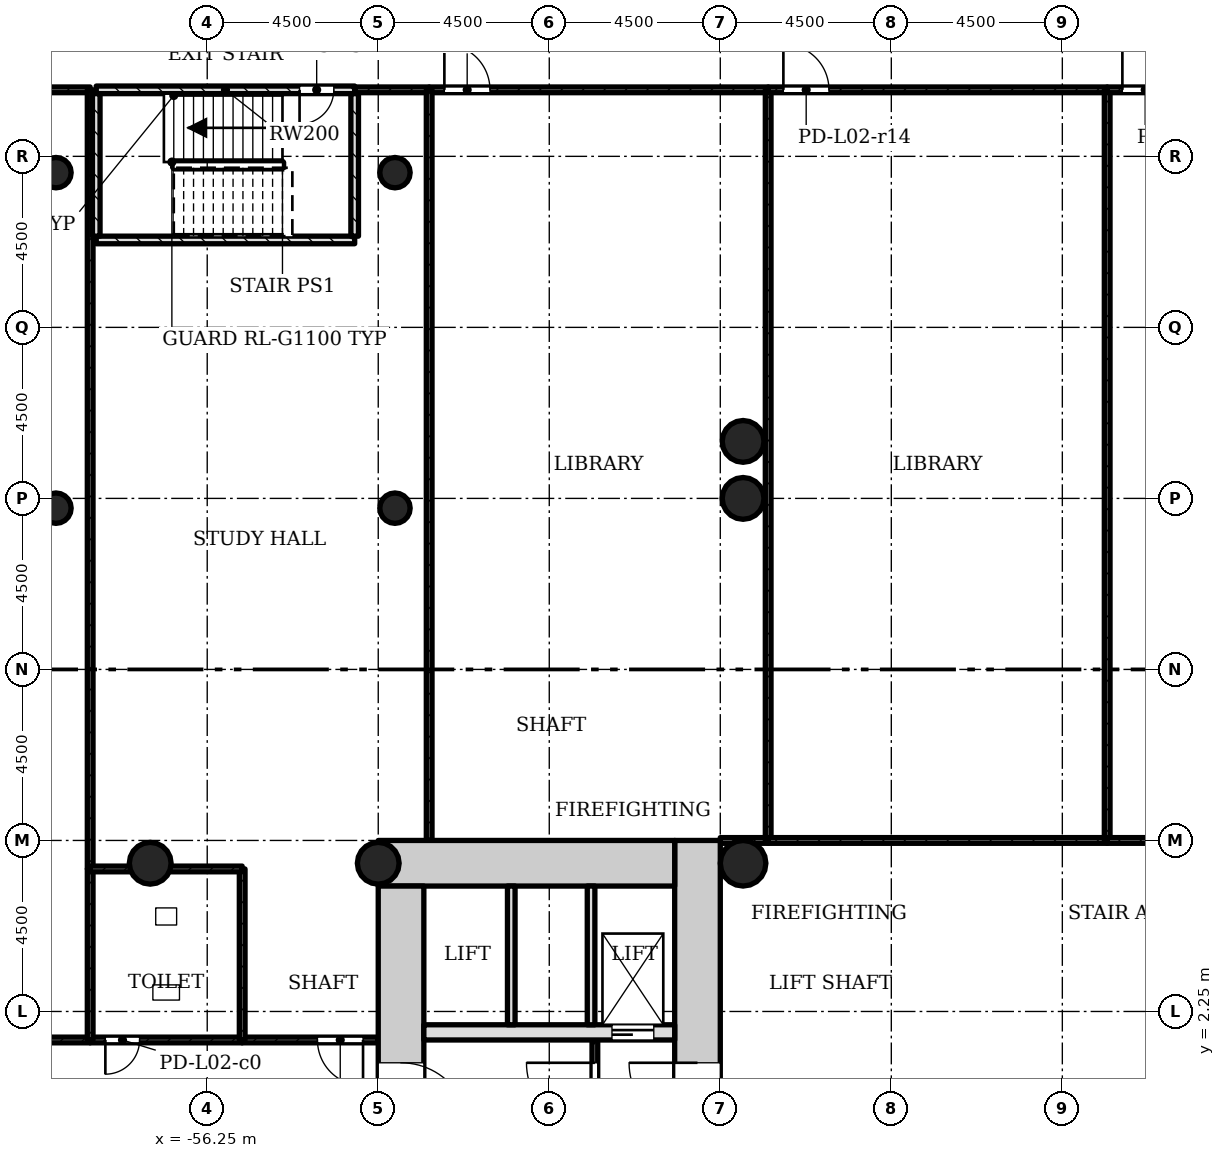
"""IFC4 building model, lengths in metres.
Left out: names, types, materials, properties, quantities, classifications, styles, units other than length and angle.
Written with IfcOpenShell. Run it as: python <this file> out.ifc"""

import sys

from ifc_helpers import new_model, si_unit, direction, frame, frame_2d, origin, origin_2d, place, context, subcontext, project, spatial, rectangle, hollow_circle, extrude, element, fill, save


model = new_model("IFC4")
c1 = context("Model", 3, precision=1e-05, world=origin(), true_north=direction((0.0, 1.0)))
c2 = subcontext(c1, "Body", "Model", "MODEL_VIEW")
j1 = project(units=[si_unit("LENGTHUNIT", "METRE"), si_unit("PLANEANGLEUNIT", "RADIAN")], contexts=[c1])
p1 = place(None, origin())
s1 = spatial("IfcSite", under=j1, at=p1, CompositionType="ELEMENT")
p2 = place(p1, origin())
s2 = spatial("IfcBuilding", under=s1, at=p2, CompositionType="ELEMENT")
p3 = place(p2, frame((0.0, 0.0, 11.0)))
s3 = spatial("IfcBuildingStorey", under=s2, at=p3, CompositionType="ELEMENT", Elevation=11.0)
p4 = place(p3, frame((-43.35, -5.55, 0.0), z_axis=(0.0, 0.0, 1.0), x_axis=(0.0, 1.0, 0.0)))
e1 = element("IfcWall", 1, at=p4, inside=s3, PredefinedType="SHEAR", context=c2, shape_type="SweptSolid", body=[
    extrude(rectangle(XDim=12.3, YDim=1.2, at=frame_2d((6.15, 0.0))), origin(), (0.0, 0.0, 1.0), 4.5),
])
p5 = place(p4, frame((4.65, 0.0, 0.0)))
e2 = element("IfcOpeningElement", 2, at=p5, cuts=e1, PredefinedType="OPENING", context=c2, shape_type="SweptSolid", body=[
    extrude(rectangle(XDim=1.8, YDim=2.1, at=frame_2d((0.9, 1.05))), frame((0.0, 0.61, 0.0), z_axis=(0.0, -1.0, 0.0), x_axis=(1.0, 0.0, 0.0)), (0.0, 0.0, 1.0), 1.22),
])
p6 = place(p3, frame((-43.95, 6.15, 0.0), z_axis=(0.0, 0.0, 1.0), x_axis=(-1.0, 0.0, 0.0)))
e3 = element("IfcWall", 3, at=p6, inside=s3, PredefinedType="SHEAR", context=c2, shape_type="SweptSolid", body=[
    extrude(rectangle(XDim=7.8, YDim=1.2, at=frame_2d((3.9, 0.0))), origin(), (0.0, 0.0, 1.0), 4.5),
])
p7 = place(p3, frame((-51.15, 5.55, 0.0), z_axis=(0.0, 0.0, 1.0), x_axis=(0.0, -1.0, 0.0)))
e4 = element("IfcWall", 4, at=p7, inside=s3, PredefinedType="SHEAR", context=c2, shape_type="SweptSolid", body=[
    extrude(rectangle(XDim=12.3, YDim=1.2, at=frame_2d((6.15, 0.0))), origin(), (0.0, 0.0, 1.0), 4.5),
])
p8 = place(p7, frame((4.65, 0.0, 0.0)))
e5 = element("IfcOpeningElement", 5, at=p8, cuts=e4, PredefinedType="OPENING", context=c2, shape_type="SweptSolid", body=[
    extrude(rectangle(XDim=1.8, YDim=2.1, at=frame_2d((0.9, 1.05))), frame((0.0, 0.61, 0.0), z_axis=(0.0, -1.0, 0.0), x_axis=(1.0, 0.0, 0.0)), (0.0, 0.0, 1.0), 1.22),
])
p9 = place(p3, frame((-50.55, 1.7, 0.0), z_axis=(0.0, 0.0, 1.0), x_axis=(1.0, 0.0, 0.0)))
e6 = element("IfcWall", 6, at=p9, inside=s3, PredefinedType="SHEAR", context=c2, shape_type="SweptSolid", body=[
    extrude(rectangle(XDim=6.6, YDim=0.4, at=frame_2d((3.3, 0.0))), origin(), (0.0, 0.0, 1.0), 4.5),
])
p10 = place(p9, frame((4.95, 0.0, 0.0)))
e7 = element("IfcOpeningElement", 7, at=p10, cuts=e6, PredefinedType="OPENING", context=c2, shape_type="SweptSolid", body=[
    extrude(rectangle(XDim=1.1, YDim=2.1, at=frame_2d((0.55, 1.05))), frame((0.0, 0.21, 0.0), z_axis=(0.0, -1.0, 0.0), x_axis=(1.0, 0.0, 0.0)), (0.0, 0.0, 1.0), 0.42),
])
for number, where, z_axis, x_axis in (
    (8, (-42.15, 15.75, 0.0), (0.0, 0.0, 1.0), (1.0, 0.0, 0.0)),
    (9, (-42.15, 17.25, 0.0), (0.0, 0.0, 1.0), (1.0, 0.0, 0.0)),
    (10, (-51.75, 6.15, 0.0), (0.0, 0.0, 1.0), (1.0, 0.0, 0.0)),
    (11, (-57.75, 6.15, 0.0), (0.0, 0.0, 1.0), (1.0, 0.0, 0.0)),
):
    element("IfcColumn", number, at=place(p3, frame(where, z_axis=z_axis, x_axis=x_axis)), inside=s3, PredefinedType="COLUMN", context=c2, shape_type="SweptSolid", body=[
        extrude(hollow_circle(Radius=0.55, WallThickness=0.04, at=origin_2d()), origin(), (0.0, 0.0, 1.0), 4.5),
    ])
p11 = place(p3, frame((-42.15, 6.15, 0.0), z_axis=(0.0, 0.0, 1.0), x_axis=(1.0, 0.0, 0.0)))
e12 = element("IfcColumn", 12, at=p11, inside=s3, PredefinedType="COLUMN", context=c2, shape_type="SweptSolid", body=[
    extrude(hollow_circle(Radius=0.6, WallThickness=0.045, at=origin_2d()), origin(), (0.0, 0.0, 1.0), 4.5),
])
for number, where, z_axis, x_axis in (
    (13, (-60.23, 15.493, 0.0), (0.0, 0.0, 1.0), (1.0, 0.0, 0.0)),
    (14, (-51.31, 15.493, 0.0), (0.0, 0.0, 1.0), (1.0, 0.0, 0.0)),
    (15, (-60.23, 24.321, 0.0), (0.0, 0.0, 1.0), (1.0, 0.0, 0.0)),
    (16, (-51.31, 24.321, 0.0), (0.0, 0.0, 1.0), (1.0, 0.0, 0.0)),
):
    element("IfcColumn", number, at=place(p3, frame(where, z_axis=z_axis, x_axis=x_axis)), inside=s3, PredefinedType="COLUMN", context=c2, shape_type="SweptSolid", body=[
        extrude(hollow_circle(Radius=0.4, WallThickness=0.028, at=origin_2d()), origin(), (0.0, 0.0, 1.0), 4.5),
    ])
p12 = place(p3, frame((-46.05, 1.5, 0.0), z_axis=(0.0, 0.0, 1.0), x_axis=(0.0, -1.0, 0.0)))
e17 = element("IfcWall", 17, at=p12, inside=s3, PredefinedType="PARTITIONING", context=c2, shape_type="SweptSolid", body=[
    extrude(rectangle(XDim=3.0, YDim=0.15, at=frame_2d((1.5, 0.0))), origin(), (0.0, 0.0, 1.0), 4.08),
])
p13 = place(p12, frame((0.6, 0.0, 0.0)))
e18 = element("IfcOpeningElement", 18, at=p13, cuts=e17, PredefinedType="OPENING", context=c2, shape_type="SweptSolid", body=[
    extrude(rectangle(XDim=1.8, YDim=2.1, at=frame_2d((0.9, 1.05))), frame((0.0, 0.085, 0.0), z_axis=(0.0, -1.0, 0.0), x_axis=(1.0, 0.0, 0.0)), (0.0, 0.0, 1.0), 0.17),
])
for number, where, z_axis, x_axis in (
    (19, (-46.15, 5.55, 0.0), (0.0, 0.0, 1.0), (0.0, -1.0, 0.0)),
    (20, (-48.25, 5.55, 0.0), (0.0, 0.0, 1.0), (0.0, -1.0, 0.0)),
):
    element("IfcWall", number, at=place(p3, frame(where, z_axis=z_axis, x_axis=x_axis)), inside=s3, PredefinedType="SOLIDWALL", context=c2, shape_type="SweptSolid", body=[
        extrude(rectangle(XDim=3.65, YDim=0.2, at=frame_2d((1.825, 0.0))), origin(), (0.0, 0.0, 1.0), 4.08),
    ])
p14 = place(p3, frame((-59.33, 1.5, 0.0), z_axis=(0.0, 0.0, 1.0), x_axis=(-1.0, 0.0, 0.0)))
e21 = element("IfcWall", 21, at=p14, inside=s3, PredefinedType="PARTITIONING", context=c2, shape_type="SweptSolid", body=[
    extrude(rectangle(XDim=1.96, YDim=0.15, at=frame_2d((0.98, 0.0))), origin(), (0.0, 0.0, 1.0), 4.08),
])
p15 = place(p3, frame((-69.85, 26.5, 0.0), z_axis=(0.0, 0.0, 1.0), x_axis=(1.0, 0.0, 0.0)))
e22 = element("IfcWall", 22, at=p15, inside=s3, PredefinedType="PARTITIONING", context=c2, shape_type="SweptSolid", body=[
    extrude(rectangle(XDim=10.52, YDim=0.15, at=frame_2d((5.26, 0.0))), origin(), (0.0, 0.0, 1.0), 4.08),
])
p16 = place(p15, frame((0.9, 0.0, 0.0)))
e23 = element("IfcOpeningElement", 23, at=p16, cuts=e22, PredefinedType="OPENING", context=c2, shape_type="SweptSolid", body=[
    extrude(rectangle(XDim=1.2, YDim=2.1, at=frame_2d((0.6, 1.05))), frame((0.0, 0.085, 0.0), z_axis=(0.0, -1.0, 0.0), x_axis=(1.0, 0.0, 0.0)), (0.0, 0.0, 1.0), 0.17),
])
p17 = place(p3, frame((-59.33, 26.5, 0.0), z_axis=(0.0, 0.0, 1.0), x_axis=(0.0, -1.0, 0.0)))
e24 = element("IfcWall", 24, at=p17, inside=s3, PredefinedType="PARTITIONING", context=c2, shape_type="SweptSolid", body=[
    extrude(rectangle(XDim=20.5, YDim=0.15, at=frame_2d((10.25, 0.0))), origin(), (0.0, 0.0, 1.0), 4.08),
])
p18 = place(p3, frame((-51.75, 1.5, 0.0), z_axis=(0.0, 0.0, 1.0), x_axis=(-1.0, 0.0, 0.0)))
e25 = element("IfcWall", 25, at=p18, inside=s3, PredefinedType="PARTITIONING", context=c2, shape_type="SweptSolid", body=[
    extrude(rectangle(XDim=3.58, YDim=0.15, at=frame_2d((1.79, 0.0))), origin(), (0.0, 0.0, 1.0), 4.08),
])
p19 = place(p18, frame((0.4, 0.0, 0.0)))
e26 = element("IfcOpeningElement", 26, at=p19, cuts=e25, PredefinedType="OPENING", context=c2, shape_type="SweptSolid", body=[
    extrude(rectangle(XDim=1.2, YDim=2.1, at=frame_2d((0.6, 1.05))), frame((0.0, 0.085, 0.0), z_axis=(0.0, -1.0, 0.0), x_axis=(1.0, 0.0, 0.0)), (0.0, 0.0, 1.0), 0.17),
])
p20 = place(p3, frame((-52.37, 26.5, 0.0), z_axis=(0.0, 0.0, 1.0), x_axis=(1.0, 0.0, 0.0)))
e27 = element("IfcWall", 27, at=p20, inside=s3, PredefinedType="PARTITIONING", context=c2, shape_type="SweptSolid", body=[
    extrude(rectangle(XDim=1.96, YDim=0.15, at=frame_2d((0.98, 0.0))), origin(), (0.0, 0.0, 1.0), 4.08),
])
p21 = place(p3, frame((-50.41, 26.5, 0.0), z_axis=(0.0, 0.0, 1.0), x_axis=(1.0, 0.0, 0.0)))
e28 = element("IfcWall", 28, at=p21, inside=s3, PredefinedType="PARTITIONING", context=c2, shape_type="SweptSolid", body=[
    extrude(rectangle(XDim=8.92, YDim=0.15, at=frame_2d((4.46, 0.0))), origin(), (0.0, 0.0, 1.0), 4.08),
])
p22 = place(p21, frame((0.4, 0.0, 0.0)))
e29 = element("IfcOpeningElement", 29, at=p22, cuts=e28, PredefinedType="OPENING", context=c2, shape_type="SweptSolid", body=[
    extrude(rectangle(XDim=1.2, YDim=2.1, at=frame_2d((0.6, 1.05))), frame((0.0, 0.085, 0.0), z_axis=(0.0, -1.0, 0.0), x_axis=(1.0, 0.0, 0.0)), (0.0, 0.0, 1.0), 0.17),
])
p23 = place(p3, frame((-41.49, 6.75, 0.0), z_axis=(0.0, 0.0, 1.0), x_axis=(-1.0, 0.0, 0.0)))
e30 = element("IfcWall", 30, at=p23, inside=s3, PredefinedType="PARTITIONING", context=c2, shape_type="SweptSolid", body=[
    extrude(rectangle(XDim=1.26, YDim=0.15, at=frame_2d((0.63, 0.0))), origin(), (0.0, 0.0, 1.0), 4.08),
])
for number, where, z_axis, x_axis in (
    (31, (-50.41, 6.75, 0.0), (0.0, 0.0, 1.0), (0.0, 1.0, 0.0)),
    (32, (-41.49, 26.5, 0.0), (0.0, 0.0, 1.0), (0.0, -1.0, 0.0)),
):
    element("IfcWall", number, at=place(p3, frame(where, z_axis=z_axis, x_axis=x_axis)), inside=s3, PredefinedType="PARTITIONING", context=c2, shape_type="SweptSolid", body=[
        extrude(rectangle(XDim=19.75, YDim=0.15, at=frame_2d((9.875, 0.0))), origin(), (0.0, 0.0, 1.0), 4.08),
    ])
p24 = place(p3, frame((-41.49, 26.5, 0.0), z_axis=(0.0, 0.0, 1.0), x_axis=(1.0, 0.0, 0.0)))
e33 = element("IfcWall", 33, at=p24, inside=s3, PredefinedType="PARTITIONING", context=c2, shape_type="SweptSolid", body=[
    extrude(rectangle(XDim=8.92, YDim=0.15, at=frame_2d((4.46, 0.0))), origin(), (0.0, 0.0, 1.0), 4.08),
])
p25 = place(p24, frame((0.4, 0.0, 0.0)))
e34 = element("IfcOpeningElement", 34, at=p25, cuts=e33, PredefinedType="OPENING", context=c2, shape_type="SweptSolid", body=[
    extrude(rectangle(XDim=1.2, YDim=2.1, at=frame_2d((0.6, 1.05))), frame((0.0, 0.085, 0.0), z_axis=(0.0, -1.0, 0.0), x_axis=(1.0, 0.0, 0.0)), (0.0, 0.0, 1.0), 0.17),
])
p26 = place(p3, frame((-32.57, 6.75, 0.0), z_axis=(0.0, 0.0, 1.0), x_axis=(-1.0, 0.0, 0.0)))
e35 = element("IfcWall", 35, at=p26, inside=s3, PredefinedType="PARTITIONING", context=c2, shape_type="SweptSolid", body=[
    extrude(rectangle(XDim=8.92, YDim=0.15, at=frame_2d((4.46, 0.0))), origin(), (0.0, 0.0, 1.0), 4.08),
])
p27 = place(p3, frame((-32.57, 26.5, 0.0), z_axis=(0.0, 0.0, 1.0), x_axis=(0.0, -1.0, 0.0)))
e36 = element("IfcWall", 36, at=p27, inside=s3, PredefinedType="PARTITIONING", context=c2, shape_type="SweptSolid", body=[
    extrude(rectangle(XDim=19.75, YDim=0.15, at=frame_2d((9.875, 0.0))), origin(), (0.0, 0.0, 1.0), 4.08),
])
p28 = place(p3, frame((-29.25, 6.75, 0.0), z_axis=(0.0, 0.0, 1.0), x_axis=(-1.0, 0.0, 0.0)))
e37 = element("IfcWall", 37, at=p28, inside=s3, PredefinedType="PARTITIONING", context=c2, shape_type="SweptSolid", body=[
    extrude(rectangle(XDim=3.32, YDim=0.15, at=frame_2d((1.66, 0.0))), origin(), (0.0, 0.0, 1.0), 4.08),
])
p29 = place(p3, frame((-32.57, 26.5, 0.0), z_axis=(0.0, 0.0, 1.0), x_axis=(1.0, 0.0, 0.0)))
e38 = element("IfcWall", 38, at=p29, inside=s3, PredefinedType="PARTITIONING", context=c2, shape_type="SweptSolid", body=[
    extrude(rectangle(XDim=8.92, YDim=0.15, at=frame_2d((4.46, 0.0))), origin(), (0.0, 0.0, 1.0), 4.08),
])
p30 = place(p29, frame((0.4, 0.0, 0.0)))
e39 = element("IfcOpeningElement", 39, at=p30, cuts=e38, PredefinedType="OPENING", context=c2, shape_type="SweptSolid", body=[
    extrude(rectangle(XDim=1.2, YDim=2.1, at=frame_2d((0.6, 1.05))), frame((0.0, 0.085, 0.0), z_axis=(0.0, -1.0, 0.0), x_axis=(1.0, 0.0, 0.0)), (0.0, 0.0, 1.0), 0.17),
])
p31 = place(p3, frame((-59.33, 1.5, 0.0), z_axis=(0.0, 0.0, 1.0), x_axis=(1.0, 0.0, 0.0)))
e40 = element("IfcWall", 40, at=p31, inside=s3, PredefinedType="PARTITIONING", context=c2, shape_type="SweptSolid", body=[
    extrude(rectangle(XDim=4.0, YDim=0.15, at=frame_2d((2.0, 0.0))), origin(), (0.0, 0.0, 1.0), 4.08),
])
p32 = place(p31, frame((0.4, 0.0, 0.0)))
e41 = element("IfcOpeningElement", 41, at=p32, cuts=e40, PredefinedType="OPENING", context=c2, shape_type="SweptSolid", body=[
    extrude(rectangle(XDim=0.9, YDim=2.1, at=frame_2d((0.45, 1.05))), frame((0.0, 0.085, 0.0), z_axis=(0.0, -1.0, 0.0), x_axis=(1.0, 0.0, 0.0)), (0.0, 0.0, 1.0), 0.17),
])
for number, where, z_axis, x_axis in (
    (42, (-59.33, 6.0, 0.0), (0.0, 0.0, 1.0), (0.0, -1.0, 0.0)),
    (43, (-55.33, 1.5, 0.0), (0.0, 0.0, 1.0), (0.0, 1.0, 0.0)),
):
    element("IfcWall", number, at=place(p3, frame(where, z_axis=z_axis, x_axis=x_axis)), inside=s3, PredefinedType="PARTITIONING", context=c2, shape_type="SweptSolid", body=[
        extrude(rectangle(XDim=4.5, YDim=0.15, at=frame_2d((2.25, 0.0))), origin(), (0.0, 0.0, 1.0), 4.08),
    ])
p33 = place(p3, frame((-55.33, 6.0, 0.0), z_axis=(0.0, 0.0, 1.0), x_axis=(-1.0, 0.0, 0.0)))
e44 = element("IfcWall", 44, at=p33, inside=s3, PredefinedType="PARTITIONING", context=c2, shape_type="SweptSolid", body=[
    extrude(rectangle(XDim=4.0, YDim=0.15, at=frame_2d((2.0, 0.0))), origin(), (0.0, 0.0, 1.0), 4.08),
])
p34 = place(p3, frame((-59.17, 26.5, 0.0), z_axis=(0.0, 0.0, 1.0), x_axis=(1.0, 0.0, 0.0)))
e45 = element("IfcWall", 45, at=p34, inside=s3, PredefinedType="SHEAR", context=c2, shape_type="SweptSolid", body=[
    extrude(rectangle(XDim=6.8, YDim=0.2, at=frame_2d((3.4, 0.0))), origin(), (0.0, 0.0, 1.0), 4.08),
])
p35 = place(p34, frame((5.35, 0.0, 0.0)))
e46 = element("IfcOpeningElement", 46, at=p35, cuts=e45, PredefinedType="OPENING", context=c2, shape_type="SweptSolid", body=[
    extrude(rectangle(XDim=0.9, YDim=2.1, at=frame_2d((0.45, 1.05))), frame((0.0, 0.11, 0.0), z_axis=(0.0, -1.0, 0.0), x_axis=(1.0, 0.0, 0.0)), (0.0, 0.0, 1.0), 0.22),
])
p36 = place(p3, frame((-59.17, 22.55, 0.0), z_axis=(0.0, 0.0, 1.0), x_axis=(1.0, 0.0, 0.0)))
e47 = element("IfcWall", 47, at=p36, inside=s3, PredefinedType="SHEAR", context=c2, shape_type="SweptSolid", body=[
    extrude(rectangle(XDim=6.8, YDim=0.2, at=frame_2d((3.4, 0.0))), origin(), (0.0, 0.0, 1.0), 4.08),
])
for number, where, z_axis, x_axis in (
    (48, (-59.17, 22.65, 0.0), (0.0, 0.0, 1.0), (0.0, 1.0, 0.0)),
    (49, (-52.37, 22.65, 0.0), (0.0, 0.0, 1.0), (0.0, 1.0, 0.0)),
):
    element("IfcWall", number, at=place(p3, frame(where, z_axis=z_axis, x_axis=x_axis)), inside=s3, PredefinedType="SHEAR", context=c2, shape_type="SweptSolid", body=[
        extrude(rectangle(XDim=3.75, YDim=0.2, at=frame_2d((1.875, 0.0))), origin(), (0.0, 0.0, 1.0), 4.08),
    ])
p37 = place(p13, origin())
e50 = element("IfcDoor", 50, at=p37, inside=s3, OperationType="SINGLE_SWING_LEFT", PredefinedType="DOOR", context=c2, shape_type="SweptSolid", body=[
    extrude(rectangle(XDim=1.8, YDim=2.1, at=frame_2d((0.9, 1.05))), frame((0.0, 0.025, 0.0), z_axis=(0.0, -1.0, 0.0), x_axis=(1.0, 0.0, 0.0)), (0.0, 0.0, 1.0), 0.05),
])
fill(e18, e50)
p38 = place(p19, origin())
e51 = element("IfcDoor", 51, at=p38, inside=s3, OperationType="SINGLE_SWING_RIGHT", PredefinedType="DOOR", context=c2, shape_type="SweptSolid", body=[
    extrude(rectangle(XDim=1.2, YDim=2.1, at=frame_2d((0.6, 1.05))), frame((0.0, 0.025, 0.0), z_axis=(0.0, -1.0, 0.0), x_axis=(1.0, 0.0, 0.0)), (0.0, 0.0, 1.0), 0.05),
])
fill(e26, e51)
p39 = place(p22, origin())
e52 = element("IfcDoor", 52, at=p39, inside=s3, OperationType="SINGLE_SWING_RIGHT", PredefinedType="DOOR", context=c2, shape_type="SweptSolid", body=[
    extrude(rectangle(XDim=1.2, YDim=2.1, at=frame_2d((0.6, 1.05))), frame((0.0, 0.025, 0.0), z_axis=(0.0, -1.0, 0.0), x_axis=(1.0, 0.0, 0.0)), (0.0, 0.0, 1.0), 0.05),
])
fill(e29, e52)
p40 = place(p25, origin())
e53 = element("IfcDoor", 53, at=p40, inside=s3, OperationType="SINGLE_SWING_RIGHT", PredefinedType="DOOR", context=c2, shape_type="SweptSolid", body=[
    extrude(rectangle(XDim=1.2, YDim=2.1, at=frame_2d((0.6, 1.05))), frame((0.0, 0.025, 0.0), z_axis=(0.0, -1.0, 0.0), x_axis=(1.0, 0.0, 0.0)), (0.0, 0.0, 1.0), 0.05),
])
fill(e34, e53)
p41 = place(p30, origin())
e54 = element("IfcDoor", 54, at=p41, inside=s3, OperationType="SINGLE_SWING_RIGHT", PredefinedType="DOOR", context=c2, shape_type="SweptSolid", body=[
    extrude(rectangle(XDim=1.2, YDim=2.1, at=frame_2d((0.6, 1.05))), frame((0.0, 0.025, 0.0), z_axis=(0.0, -1.0, 0.0), x_axis=(1.0, 0.0, 0.0)), (0.0, 0.0, 1.0), 0.05),
])
fill(e39, e54)
p42 = place(p32, origin())
e55 = element("IfcDoor", 55, at=p42, inside=s3, OperationType="SINGLE_SWING_LEFT", PredefinedType="DOOR", context=c2, shape_type="SweptSolid", body=[
    extrude(rectangle(XDim=0.9, YDim=2.1, at=frame_2d((0.45, 1.05))), frame((0.0, 0.025, 0.0), z_axis=(0.0, -1.0, 0.0), x_axis=(1.0, 0.0, 0.0)), (0.0, 0.0, 1.0), 0.05),
])
fill(e41, e55)
p43 = place(p35, origin())
e56 = element("IfcDoor", 56, at=p43, inside=s3, OperationType="SINGLE_SWING_LEFT", PredefinedType="DOOR", context=c2, shape_type="SweptSolid", body=[
    extrude(rectangle(XDim=0.9, YDim=2.1, at=frame_2d((0.45, 1.05))), frame((0.0, 0.025, 0.0), z_axis=(0.0, -1.0, 0.0), x_axis=(1.0, 0.0, 0.0)), (0.0, 0.0, 1.0), 0.05),
])
fill(e46, e56)
p44 = place(p10, origin())
e57 = element("IfcDoor", 57, at=p44, inside=s3, OperationType="SLIDING_TO_LEFT", PredefinedType="DOOR", context=c2, shape_type="SweptSolid", body=[
    extrude(rectangle(XDim=1.1, YDim=2.1, at=frame_2d((0.55, 1.05))), frame((0.0, 0.025, 0.0), z_axis=(0.0, -1.0, 0.0), x_axis=(1.0, 0.0, 0.0)), (0.0, 0.0, 1.0), 0.05),
])
fill(e7, e57)
p45 = place(p5, origin())
e58 = element("IfcDoor", 58, at=p45, inside=s3, OperationType="SINGLE_SWING_LEFT", PredefinedType="DOOR", context=c2, shape_type="SweptSolid", body=[
    extrude(rectangle(XDim=1.8, YDim=2.1, at=frame_2d((0.9, 1.05))), frame((0.0, 0.025, 0.0), z_axis=(0.0, -1.0, 0.0), x_axis=(1.0, 0.0, 0.0)), (0.0, 0.0, 1.0), 0.05),
])
fill(e2, e58)
p46 = place(p8, origin())
e59 = element("IfcDoor", 59, at=p46, inside=s3, OperationType="SINGLE_SWING_LEFT", PredefinedType="DOOR", context=c2, shape_type="SweptSolid", body=[
    extrude(rectangle(XDim=1.8, YDim=2.1, at=frame_2d((0.9, 1.05))), frame((0.0, 0.025, 0.0), z_axis=(0.0, -1.0, 0.0), x_axis=(1.0, 0.0, 0.0)), (0.0, 0.0, 1.0), 0.05),
])
fill(e5, e59)
save(model, sys.argv[1])
